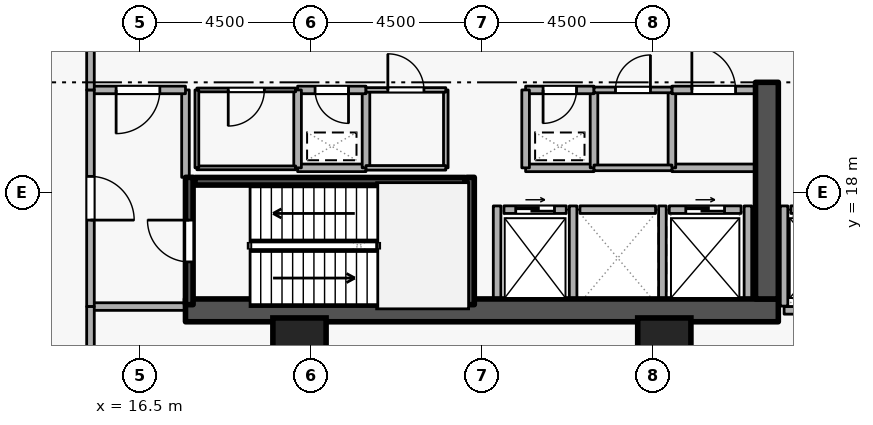
"""IFC4 building model, lengths in metres.
Left out: names, types, materials, properties, quantities, classifications, styles, units other than length and angle.
Written with IfcOpenShell. Run it as: python <this file> out.ifc"""

import sys

from ifc_helpers import new_model, si_unit, direction, frame, frame_2d, origin, origin_2d, place, context, subcontext, project, spatial, rectangle, extrude, element, fill, save


model = new_model("IFC4")
c1 = context("Model", 3, precision=1e-05, world=origin(), true_north=direction((0.0, 1.0)))
c2 = subcontext(c1, "Body", "Model", "MODEL_VIEW")
j1 = project(units=[si_unit("LENGTHUNIT", "METRE"), si_unit("PLANEANGLEUNIT", "RADIAN")], contexts=[c1])
p1 = place(None, origin())
s1 = spatial("IfcSite", under=j1, at=p1, CompositionType="ELEMENT")
p2 = place(p1, origin())
s2 = spatial("IfcBuilding", under=s1, at=p2, CompositionType="ELEMENT")
p3 = place(p2, frame((0.0, 0.0, 71.7)))
s3 = spatial("IfcBuildingStorey", under=s2, at=p3, CompositionType="ELEMENT", Elevation=71.7)
p4 = place(p3, frame((17.7, 14.9, 0.0), z_axis=(0.0, 0.0, 1.0), x_axis=(1.0, 0.0, 0.0)))
e1 = element("IfcWall", 1, at=p4, inside=s3, PredefinedType="SHEAR", context=c2, shape_type="SweptSolid", body=[
    extrude(rectangle(XDim=15.6, YDim=0.6, at=frame_2d((7.8, 0.0))), origin(), (0.0, 0.0, 1.0), 4.2),
])
p5 = place(p3, frame((33.0, 15.2, 0.0), z_axis=(0.0, 0.0, 1.0), x_axis=(0.0, 1.0, 0.0)))
e2 = element("IfcWall", 2, at=p5, inside=s3, PredefinedType="SHEAR", context=c2, shape_type="SweptSolid", body=[
    extrude(rectangle(XDim=5.7, YDim=0.6, at=frame_2d((2.85, 0.0))), origin(), (0.0, 0.0, 1.0), 4.2),
])
for number, where, z_axis, x_axis in (
    (3, (20.7, 14.0, 0.0), (0.0, 0.0, 1.0), (1.0, 0.0, 0.0)),
    (4, (30.3, 14.0, 0.0), (0.0, 0.0, 1.0), (1.0, 0.0, 0.0)),
):
    element("IfcColumn", number, at=place(p3, frame(where, z_axis=z_axis, x_axis=x_axis)), inside=s3, PredefinedType="COLUMN", context=c2, shape_type="SweptSolid", body=[
        extrude(rectangle(XDim=1.4, YDim=1.4, at=origin_2d()), origin(), (0.0, 0.0, 1.0), 4.2),
    ])
p6 = place(p3, frame((26.08, 17.55, 0.0), z_axis=(0.0, 0.0, 1.0), x_axis=(1.0, 0.0, 0.0)))
e5 = element("IfcWall", 5, at=p6, inside=s3, PredefinedType="STANDARD", context=c2, shape_type="SweptSolid", body=[
    extrude(rectangle(XDim=1.64, YDim=0.2, at=frame_2d((0.82, 0.0))), origin(), (0.0, 0.0, 1.0), 3.86),
])
p7 = place(p6, frame((0.31, 0.0, 0.0)))
e6 = element("IfcOpeningElement", 6, at=p7, cuts=e5, PredefinedType="OPENING", context=c2, shape_type="SweptSolid", body=[
    extrude(rectangle(XDim=1.02, YDim=2.06, at=frame_2d((0.51, 1.03))), frame((0.0, 0.11, 0.0), z_axis=(0.0, -1.0, 0.0), x_axis=(1.0, 0.0, 0.0)), (0.0, 0.0, 1.0), 0.22),
])
p8 = place(p3, frame((28.08, 17.55, 0.0), z_axis=(0.0, 0.0, 1.0), x_axis=(1.0, 0.0, 0.0)))
e7 = element("IfcWall", 7, at=p8, inside=s3, PredefinedType="STANDARD", context=c2, shape_type="SweptSolid", body=[
    extrude(rectangle(XDim=1.99, YDim=0.2, at=frame_2d((0.995, 0.0))), origin(), (0.0, 0.0, 1.0), 3.86),
])
p9 = place(p3, frame((30.43, 17.55, 0.0), z_axis=(0.0, 0.0, 1.0), x_axis=(1.0, 0.0, 0.0)))
e8 = element("IfcWall", 8, at=p9, inside=s3, PredefinedType="STANDARD", context=c2, shape_type="SweptSolid", body=[
    extrude(rectangle(XDim=1.89, YDim=0.2, at=frame_2d((0.945, 0.0))), origin(), (0.0, 0.0, 1.0), 3.86),
])
p10 = place(p9, frame((0.435, 0.0, 0.0)))
e9 = element("IfcOpeningElement", 9, at=p10, cuts=e8, PredefinedType="OPENING", context=c2, shape_type="SweptSolid", body=[
    extrude(rectangle(XDim=1.02, YDim=2.06, at=frame_2d((0.51, 1.03))), frame((0.0, 0.11, 0.0), z_axis=(0.0, -1.0, 0.0), x_axis=(1.0, 0.0, 0.0)), (0.0, 0.0, 1.0), 0.22),
])
p11 = place(p3, frame((33.63, 17.55, 0.0), z_axis=(0.0, 0.0, 1.0), x_axis=(1.0, 0.0, 0.0)))
e10 = element("IfcWall", 10, at=p11, inside=s3, PredefinedType="STANDARD", context=c2, shape_type="SweptSolid", body=[
    extrude(rectangle(XDim=1.74, YDim=0.2, at=frame_2d((0.87, 0.0))), origin(), (0.0, 0.0, 1.0), 3.86),
])
p12 = place(p11, frame((0.36, 0.0, 0.0)))
e11 = element("IfcOpeningElement", 11, at=p12, cuts=e10, PredefinedType="OPENING", context=c2, shape_type="SweptSolid", body=[
    extrude(rectangle(XDim=1.02, YDim=2.06, at=frame_2d((0.51, 1.03))), frame((0.0, 0.11, 0.0), z_axis=(0.0, -1.0, 0.0), x_axis=(1.0, 0.0, 0.0)), (0.0, 0.0, 1.0), 0.22),
])
for number, where, z_axis, x_axis in (
    (12, (27.9, 15.212, 0.0), (0.0, 0.0, 1.0), (0.0, 1.0, 0.0)),
    (13, (25.9, 15.212, 0.0), (0.0, 0.0, 1.0), (0.0, 1.0, 0.0)),
    (14, (30.25, 15.212, 0.0), (0.0, 0.0, 1.0), (0.0, 1.0, 0.0)),
    (15, (32.5, 15.212, 0.0), (0.0, 0.0, 1.0), (0.0, 1.0, 0.0)),
):
    element("IfcWall", number, at=place(p3, frame(where, z_axis=z_axis, x_axis=x_axis)), inside=s3, PredefinedType="STANDARD", context=c2, shape_type="SweptSolid", body=[
        extrude(rectangle(XDim=2.436, YDim=0.2, at=frame_2d((1.218, 0.0))), origin(), (0.0, 0.0, 1.0), 3.86),
    ])
p13 = place(p3, frame((33.452, 14.9, 0.0), z_axis=(0.0, 0.0, 1.0), x_axis=(1.0, 0.0, 0.0)))
e16 = element("IfcWall", 16, at=p13, inside=s3, PredefinedType="STANDARD", context=c2, shape_type="SweptSolid", body=[
    extrude(rectangle(XDim=4.196, YDim=0.2, at=frame_2d((2.098, 0.0))), origin(), (0.0, 0.0, 1.0), 3.86),
])
p14 = place(p3, frame((33.45, 15.012, 0.0), z_axis=(0.0, 0.0, 1.0), x_axis=(0.0, 1.0, 0.0)))
e17 = element("IfcWall", 17, at=p14, inside=s3, PredefinedType="STANDARD", context=c2, shape_type="SweptSolid", body=[
    extrude(rectangle(XDim=2.636, YDim=0.2, at=frame_2d((1.318, 0.0))), origin(), (0.0, 0.0, 1.0), 3.86),
])
p15 = place(p3, frame((17.8, 15.05, 0.0), z_axis=(0.0, 0.0, 1.0), x_axis=(0.0, 1.0, 0.0)))
e18 = element("IfcWall", 18, at=p15, inside=s3, PredefinedType="SHEAR", context=c2, shape_type="SweptSolid", body=[
    extrude(rectangle(XDim=3.35, YDim=0.2, at=frame_2d((1.675, 0.0))), origin(), (0.0, 0.0, 1.0), 4.2),
])
p16 = place(p15, frame((1.125, 0.0, 0.0)))
e19 = element("IfcOpeningElement", 19, at=p16, cuts=e18, PredefinedType="OPENING", context=c2, shape_type="SweptSolid", body=[
    extrude(rectangle(XDim=1.1, YDim=2.1, at=frame_2d((0.55, 1.05))), frame((0.0, 0.11, 0.0), z_axis=(0.0, -1.0, 0.0), x_axis=(1.0, 0.0, 0.0)), (0.0, 0.0, 1.0), 0.22),
])
p17 = place(p3, frame((25.2, 18.4, 0.0), z_axis=(0.0, 0.0, 1.0), x_axis=(0.0, -1.0, 0.0)))
e20 = element("IfcWall", 20, at=p17, inside=s3, PredefinedType="SHEAR", context=c2, shape_type="SweptSolid", body=[
    extrude(rectangle(XDim=3.35, YDim=0.2, at=frame_2d((1.675, 0.0))), origin(), (0.0, 0.0, 1.0), 4.2),
])
p18 = place(p3, frame((25.05, 18.297, 0.0), z_axis=(0.0, 0.0, 1.0), x_axis=(-1.0, 0.0, 0.0)))
e21 = element("IfcWall", 21, at=p18, inside=s3, PredefinedType="SHEAR", context=c2, shape_type="SweptSolid", body=[
    extrude(rectangle(XDim=7.1, YDim=0.2, at=frame_2d((3.55, 0.0))), origin(), (0.0, 0.0, 1.0), 4.2),
])
p19 = place(p3, frame((15.2, 15.0, 0.0), z_axis=(0.0, 0.0, 1.0), x_axis=(1.0, 0.0, 0.0)))
e22 = element("IfcWall", 22, at=p19, inside=s3, PredefinedType="STANDARD", context=c2, shape_type="SweptSolid", body=[
    extrude(rectangle(XDim=2.5, YDim=0.2, at=frame_2d((1.25, 0.0))), origin(), (0.0, 0.0, 1.0), 3.86),
])
p20 = place(p3, frame((17.7, 18.4, 0.0), z_axis=(0.0, 0.0, 1.0), x_axis=(0.0, 1.0, 0.0)))
e23 = element("IfcWall", 23, at=p20, inside=s3, PredefinedType="STANDARD", context=c2, shape_type="SweptSolid", body=[
    extrude(rectangle(XDim=2.3, YDim=0.2, at=frame_2d((1.15, 0.0))), origin(), (0.0, 0.0, 1.0), 3.065),
])
p21 = place(p3, frame((17.7, 20.7, 0.0), z_axis=(0.0, 0.0, 1.0), x_axis=(-1.0, 0.0, 0.0)))
e24 = element("IfcWall", 24, at=p21, inside=s3, PredefinedType="STANDARD", context=c2, shape_type="SweptSolid", body=[
    extrude(rectangle(XDim=2.5, YDim=0.2, at=frame_2d((1.25, 0.0))), origin(), (0.0, 0.0, 1.0), 3.86),
])
p22 = place(p21, frame((0.675, 0.0, 0.0)))
e25 = element("IfcOpeningElement", 25, at=p22, cuts=e24, PredefinedType="OPENING", context=c2, shape_type="SweptSolid", body=[
    extrude(rectangle(XDim=1.15, YDim=2.1, at=frame_2d((0.575, 1.05))), frame((0.0, 0.11, 0.0), z_axis=(0.0, -1.0, 0.0), x_axis=(1.0, 0.0, 0.0)), (0.0, 0.0, 1.0), 0.22),
])
p23 = place(p3, frame((15.2, 20.7, 0.0), z_axis=(0.0, 0.0, 1.0), x_axis=(0.0, -1.0, 0.0)))
e26 = element("IfcWall", 26, at=p23, inside=s3, PredefinedType="STANDARD", context=c2, shape_type="SweptSolid", body=[
    extrude(rectangle(XDim=5.7, YDim=0.2, at=frame_2d((2.85, 0.0))), origin(), (0.0, 0.0, 1.0), 3.86),
])
p24 = place(p23, frame((2.275, 0.0, 0.0)))
e27 = element("IfcOpeningElement", 27, at=p24, cuts=e26, PredefinedType="OPENING", context=c2, shape_type="SweptSolid", body=[
    extrude(rectangle(XDim=1.15, YDim=2.1, at=frame_2d((0.575, 1.05))), frame((0.0, 0.11, 0.0), z_axis=(0.0, -1.0, 0.0), x_axis=(1.0, 0.0, 0.0)), (0.0, 0.0, 1.0), 0.22),
])
p25 = place(p3, frame((26.65, 18.65, 0.0), z_axis=(0.0, 0.0, 1.0), x_axis=(1.0, 0.0, 0.0)))
e28 = element("IfcWall", 28, at=p25, inside=s3, PredefinedType="STANDARD", context=c2, shape_type="SweptSolid", body=[
    extrude(rectangle(XDim=1.8, YDim=0.2, at=frame_2d((0.9, 0.0))), origin(), (0.0, 0.0, 1.0), 3.86),
])
p26 = place(p3, frame((28.45, 18.65, 0.0), z_axis=(0.0, 0.0, 1.0), x_axis=(0.0, 1.0, 0.0)))
e29 = element("IfcWall", 29, at=p26, inside=s3, PredefinedType="STANDARD", context=c2, shape_type="SweptSolid", body=[
    extrude(rectangle(XDim=2.05, YDim=0.2, at=frame_2d((1.025, 0.0))), origin(), (0.0, 0.0, 1.0), 3.86),
])
p27 = place(p3, frame((28.45, 20.7, 0.0), z_axis=(0.0, 0.0, 1.0), x_axis=(-1.0, 0.0, 0.0)))
e30 = element("IfcWall", 30, at=p27, inside=s3, PredefinedType="STANDARD", context=c2, shape_type="SweptSolid", body=[
    extrude(rectangle(XDim=1.8, YDim=0.2, at=frame_2d((0.9, 0.0))), origin(), (0.0, 0.0, 1.0), 3.86),
])
p28 = place(p27, frame((0.46, 0.0, 0.0)))
e31 = element("IfcOpeningElement", 31, at=p28, cuts=e30, PredefinedType="OPENING", context=c2, shape_type="SweptSolid", body=[
    extrude(rectangle(XDim=0.88, YDim=2.04, at=frame_2d((0.44, 1.02))), frame((0.0, 0.11, 0.0), z_axis=(0.0, -1.0, 0.0), x_axis=(1.0, 0.0, 0.0)), (0.0, 0.0, 1.0), 0.22),
])
p29 = place(p3, frame((26.65, 20.7, 0.0), z_axis=(0.0, 0.0, 1.0), x_axis=(0.0, -1.0, 0.0)))
e32 = element("IfcWall", 32, at=p29, inside=s3, PredefinedType="STANDARD", context=c2, shape_type="SweptSolid", body=[
    extrude(rectangle(XDim=2.05, YDim=0.2, at=frame_2d((1.025, 0.0))), origin(), (0.0, 0.0, 1.0), 3.86),
])
p30 = place(p3, frame((20.65, 18.65, 0.0), z_axis=(0.0, 0.0, 1.0), x_axis=(1.0, 0.0, 0.0)))
e33 = element("IfcWall", 33, at=p30, inside=s3, PredefinedType="STANDARD", context=c2, shape_type="SweptSolid", body=[
    extrude(rectangle(XDim=1.8, YDim=0.2, at=frame_2d((0.9, 0.0))), origin(), (0.0, 0.0, 1.0), 3.86),
])
p31 = place(p3, frame((22.45, 18.65, 0.0), z_axis=(0.0, 0.0, 1.0), x_axis=(0.0, 1.0, 0.0)))
e34 = element("IfcWall", 34, at=p31, inside=s3, PredefinedType="STANDARD", context=c2, shape_type="SweptSolid", body=[
    extrude(rectangle(XDim=2.05, YDim=0.2, at=frame_2d((1.025, 0.0))), origin(), (0.0, 0.0, 1.0), 3.86),
])
p32 = place(p3, frame((22.45, 20.7, 0.0), z_axis=(0.0, 0.0, 1.0), x_axis=(-1.0, 0.0, 0.0)))
e35 = element("IfcWall", 35, at=p32, inside=s3, PredefinedType="STANDARD", context=c2, shape_type="SweptSolid", body=[
    extrude(rectangle(XDim=1.8, YDim=0.2, at=frame_2d((0.9, 0.0))), origin(), (0.0, 0.0, 1.0), 3.86),
])
p33 = place(p32, frame((0.46, 0.0, 0.0)))
e36 = element("IfcOpeningElement", 36, at=p33, cuts=e35, PredefinedType="OPENING", context=c2, shape_type="SweptSolid", body=[
    extrude(rectangle(XDim=0.88, YDim=2.04, at=frame_2d((0.44, 1.02))), frame((0.0, 0.11, 0.0), z_axis=(0.0, -1.0, 0.0), x_axis=(1.0, 0.0, 0.0)), (0.0, 0.0, 1.0), 0.22),
])
p34 = place(p3, frame((20.65, 20.7, 0.0), z_axis=(0.0, 0.0, 1.0), x_axis=(0.0, -1.0, 0.0)))
e37 = element("IfcWall", 37, at=p34, inside=s3, PredefinedType="STANDARD", context=c2, shape_type="SweptSolid", body=[
    extrude(rectangle(XDim=2.05, YDim=0.2, at=frame_2d((1.025, 0.0))), origin(), (0.0, 0.0, 1.0), 3.86),
])
p35 = place(p3, frame((32.7, 18.65, 0.0), z_axis=(0.0, 0.0, 1.0), x_axis=(-1.0, 0.0, 0.0)))
e38 = element("IfcWall", 38, at=p35, inside=s3, PredefinedType="STANDARD", context=c2, shape_type="SweptSolid", body=[
    extrude(rectangle(XDim=2.2, YDim=0.2, at=frame_2d((1.1, 0.0))), origin(), (0.0, 0.0, 1.0), 3.86),
])
p36 = place(p3, frame((30.5, 18.65, 0.0), z_axis=(0.0, 0.0, 1.0), x_axis=(0.0, 1.0, 0.0)))
e39 = element("IfcWall", 39, at=p36, inside=s3, PredefinedType="STANDARD", context=c2, shape_type="SweptSolid", body=[
    extrude(rectangle(XDim=2.05, YDim=0.2, at=frame_2d((1.025, 0.0))), origin(), (0.0, 0.0, 1.0), 3.86),
])
p37 = place(p3, frame((30.5, 20.7, 0.0), z_axis=(0.0, 0.0, 1.0), x_axis=(1.0, 0.0, 0.0)))
e40 = element("IfcWall", 40, at=p37, inside=s3, PredefinedType="STANDARD", context=c2, shape_type="SweptSolid", body=[
    extrude(rectangle(XDim=2.2, YDim=0.2, at=frame_2d((1.1, 0.0))), origin(), (0.0, 0.0, 1.0), 3.86),
])
p38 = place(p37, frame((0.525, 0.0, 0.0)))
e41 = element("IfcOpeningElement", 41, at=p38, cuts=e40, PredefinedType="OPENING", context=c2, shape_type="SweptSolid", body=[
    extrude(rectangle(XDim=1.15, YDim=2.1, at=frame_2d((0.575, 1.05))), frame((0.0, 0.11, 0.0), z_axis=(0.0, -1.0, 0.0), x_axis=(1.0, 0.0, 0.0)), (0.0, 0.0, 1.0), 0.22),
])
p39 = place(p3, frame((15.2, 22.6, 0.0), z_axis=(0.0, 0.0, 1.0), x_axis=(0.0, -1.0, 0.0)))
e42 = element("IfcWall", 42, at=p39, inside=s3, PredefinedType="STANDARD", context=c2, shape_type="SweptSolid", body=[
    extrude(rectangle(XDim=1.9, YDim=0.2, at=frame_2d((0.95, 0.0))), origin(), (0.0, 0.0, 1.0), 3.86),
])
p40 = place(p3, frame((15.2, 15.0, 0.0), z_axis=(0.0, 0.0, 1.0), x_axis=(0.0, -1.0, 0.0)))
e43 = element("IfcWall", 43, at=p40, inside=s3, PredefinedType="STANDARD", context=c2, shape_type="SweptSolid", body=[
    extrude(rectangle(XDim=2.087, YDim=0.2, at=frame_2d((1.043, 0.0))), origin(), (0.0, 0.0, 1.0), 3.86),
])
p41 = place(p3, frame((18.0, 18.65, 0.0), z_axis=(0.0, 0.0, 1.0), x_axis=(1.0, 0.0, 0.0)))
e44 = element("IfcWall", 44, at=p41, inside=s3, PredefinedType="PARTITIONING", context=c2, shape_type="SweptSolid", body=[
    extrude(rectangle(XDim=2.6, YDim=0.1, at=frame_2d((1.3, 0.0))), origin(), (0.0, 0.0, 1.0), 3.86),
])
p42 = place(p3, frame((20.6, 20.7, 0.0), z_axis=(0.0, 0.0, 1.0), x_axis=(-1.0, 0.0, 0.0)))
e45 = element("IfcWall", 45, at=p42, inside=s3, PredefinedType="PARTITIONING", context=c2, shape_type="SweptSolid", body=[
    extrude(rectangle(XDim=2.6, YDim=0.1, at=frame_2d((1.3, 0.0))), origin(), (0.0, 0.0, 1.0), 3.86),
])
p43 = place(p42, frame((0.825, 0.0, 0.0)))
e46 = element("IfcOpeningElement", 46, at=p43, cuts=e45, PredefinedType="OPENING", context=c2, shape_type="SweptSolid", body=[
    extrude(rectangle(XDim=0.95, YDim=2.1, at=frame_2d((0.475, 1.05))), frame((0.0, 0.06, 0.0), z_axis=(0.0, -1.0, 0.0), x_axis=(1.0, 0.0, 0.0)), (0.0, 0.0, 1.0), 0.12),
])
p44 = place(p3, frame((18.0, 20.7, 0.0), z_axis=(0.0, 0.0, 1.0), x_axis=(0.0, -1.0, 0.0)))
e47 = element("IfcWall", 47, at=p44, inside=s3, PredefinedType="PARTITIONING", context=c2, shape_type="SweptSolid", body=[
    extrude(rectangle(XDim=2.05, YDim=0.1, at=frame_2d((1.025, 0.0))), origin(), (0.0, 0.0, 1.0), 3.065),
])
p45 = place(p3, frame((24.55, 20.7, 0.0), z_axis=(0.0, 0.0, 1.0), x_axis=(0.0, -1.0, 0.0)))
e48 = element("IfcWall", 48, at=p45, inside=s3, PredefinedType="PARTITIONING", context=c2, shape_type="SweptSolid", body=[
    extrude(rectangle(XDim=2.05, YDim=0.12, at=frame_2d((1.025, 0.0))), origin(), (0.0, 0.0, 1.0), 3.86),
])
p46 = place(p3, frame((24.55, 18.65, 0.0), z_axis=(0.0, 0.0, 1.0), x_axis=(-1.0, 0.0, 0.0)))
e49 = element("IfcWall", 49, at=p46, inside=s3, PredefinedType="PARTITIONING", context=c2, shape_type="SweptSolid", body=[
    extrude(rectangle(XDim=2.1, YDim=0.12, at=frame_2d((1.05, 0.0))), origin(), (0.0, 0.0, 1.0), 3.86),
])
p47 = place(p3, frame((22.45, 20.7, 0.0), z_axis=(0.0, 0.0, 1.0), x_axis=(1.0, 0.0, 0.0)))
e50 = element("IfcWall", 50, at=p47, inside=s3, PredefinedType="PARTITIONING", context=c2, shape_type="SweptSolid", body=[
    extrude(rectangle(XDim=2.1, YDim=0.12, at=frame_2d((1.05, 0.0))), origin(), (0.0, 0.0, 1.0), 3.86),
])
p48 = place(p47, frame((0.575, 0.0, 0.0)))
e51 = element("IfcOpeningElement", 51, at=p48, cuts=e50, PredefinedType="OPENING", context=c2, shape_type="SweptSolid", body=[
    extrude(rectangle(XDim=0.95, YDim=2.1, at=frame_2d((0.475, 1.05))), frame((0.0, 0.07, 0.0), z_axis=(0.0, -1.0, 0.0), x_axis=(1.0, 0.0, 0.0)), (0.0, 0.0, 1.0), 0.14),
])
p49 = place(p3, frame((30.5, 18.65, 0.0), z_axis=(0.0, 0.0, 1.0), x_axis=(-1.0, 0.0, 0.0)))
e52 = element("IfcWall", 52, at=p49, inside=s3, PredefinedType="PARTITIONING", context=c2, shape_type="SweptSolid", body=[
    extrude(rectangle(XDim=2.05, YDim=0.15, at=frame_2d((1.025, 0.0))), origin(), (0.0, 0.0, 1.0), 3.86),
])
p50 = place(p3, frame((28.45, 20.7, 0.0), z_axis=(0.0, 0.0, 1.0), x_axis=(1.0, 0.0, 0.0)))
e53 = element("IfcWall", 53, at=p50, inside=s3, PredefinedType="PARTITIONING", context=c2, shape_type="SweptSolid", body=[
    extrude(rectangle(XDim=2.05, YDim=0.15, at=frame_2d((1.025, 0.0))), origin(), (0.0, 0.0, 1.0), 3.86),
])
p51 = place(p50, frame((0.565, 0.0, 0.0)))
e54 = element("IfcOpeningElement", 54, at=p51, cuts=e53, PredefinedType="OPENING", context=c2, shape_type="SweptSolid", body=[
    extrude(rectangle(XDim=0.92, YDim=2.08, at=frame_2d((0.46, 1.04))), frame((0.0, 0.085, 0.0), z_axis=(0.0, -1.0, 0.0), x_axis=(1.0, 0.0, 0.0)), (0.0, 0.0, 1.0), 0.17),
])
p52 = place(p7, origin())
e55 = element("IfcDoor", 55, at=p52, inside=s3, OperationType="SLIDING_TO_LEFT", PredefinedType="DOOR", context=c2, shape_type="SweptSolid", body=[
    extrude(rectangle(XDim=1.02, YDim=2.06, at=frame_2d((0.51, 1.03))), frame((0.0, 0.025, 0.0), z_axis=(0.0, -1.0, 0.0), x_axis=(1.0, 0.0, 0.0)), (0.0, 0.0, 1.0), 0.05),
])
fill(e6, e55)
p53 = place(p10, origin())
e56 = element("IfcDoor", 56, at=p53, inside=s3, OperationType="SLIDING_TO_LEFT", PredefinedType="DOOR", context=c2, shape_type="SweptSolid", body=[
    extrude(rectangle(XDim=1.02, YDim=2.06, at=frame_2d((0.51, 1.03))), frame((0.0, 0.025, 0.0), z_axis=(0.0, -1.0, 0.0), x_axis=(1.0, 0.0, 0.0)), (0.0, 0.0, 1.0), 0.05),
])
fill(e9, e56)
p54 = place(p16, origin())
e57 = element("IfcDoor", 57, at=p54, inside=s3, OperationType="SINGLE_SWING_RIGHT", PredefinedType="DOOR", context=c2, shape_type="SweptSolid", body=[
    extrude(rectangle(XDim=1.1, YDim=2.1, at=frame_2d((0.55, 1.05))), frame((0.0, 0.025, 0.0), z_axis=(0.0, -1.0, 0.0), x_axis=(1.0, 0.0, 0.0)), (0.0, 0.0, 1.0), 0.05),
])
fill(e19, e57)
p55 = place(p22, origin())
e58 = element("IfcDoor", 58, at=p55, inside=s3, OperationType="SINGLE_SWING_RIGHT", PredefinedType="DOOR", context=c2, shape_type="SweptSolid", body=[
    extrude(rectangle(XDim=1.15, YDim=2.1, at=frame_2d((0.575, 1.05))), frame((0.0, 0.025, 0.0), z_axis=(0.0, -1.0, 0.0), x_axis=(1.0, 0.0, 0.0)), (0.0, 0.0, 1.0), 0.05),
])
fill(e25, e58)
p56 = place(p28, origin())
e59 = element("IfcDoor", 59, at=p56, inside=s3, OperationType="SINGLE_SWING_RIGHT", PredefinedType="DOOR", context=c2, shape_type="SweptSolid", body=[
    extrude(rectangle(XDim=0.88, YDim=2.04, at=frame_2d((0.44, 1.02))), frame((0.0, 0.025, 0.0), z_axis=(0.0, -1.0, 0.0), x_axis=(1.0, 0.0, 0.0)), (0.0, 0.0, 1.0), 0.05),
])
fill(e31, e59)
p57 = place(p33, origin())
e60 = element("IfcDoor", 60, at=p57, inside=s3, OperationType="SINGLE_SWING_LEFT", PredefinedType="DOOR", context=c2, shape_type="SweptSolid", body=[
    extrude(rectangle(XDim=0.88, YDim=2.04, at=frame_2d((0.44, 1.02))), frame((0.0, 0.025, 0.0), z_axis=(0.0, -1.0, 0.0), x_axis=(1.0, 0.0, 0.0)), (0.0, 0.0, 1.0), 0.05),
])
fill(e36, e60)
p58 = place(p43, origin())
e61 = element("IfcDoor", 61, at=p58, inside=s3, OperationType="SINGLE_SWING_RIGHT", PredefinedType="DOOR", context=c2, shape_type="SweptSolid", body=[
    extrude(rectangle(XDim=0.95, YDim=2.1, at=frame_2d((0.475, 1.05))), frame((0.0, 0.025, 0.0), z_axis=(0.0, -1.0, 0.0), x_axis=(1.0, 0.0, 0.0)), (0.0, 0.0, 1.0), 0.05),
])
fill(e46, e61)
p59 = place(p48, origin())
e62 = element("IfcDoor", 62, at=p59, inside=s3, OperationType="SINGLE_SWING_LEFT", PredefinedType="DOOR", context=c2, shape_type="SweptSolid", body=[
    extrude(rectangle(XDim=0.95, YDim=2.1, at=frame_2d((0.475, 1.05))), frame((0.0, 0.025, 0.0), z_axis=(0.0, -1.0, 0.0), x_axis=(1.0, 0.0, 0.0)), (0.0, 0.0, 1.0), 0.05),
])
fill(e51, e62)
p60 = place(p51, origin())
e63 = element("IfcDoor", 63, at=p60, inside=s3, OperationType="SINGLE_SWING_RIGHT", PredefinedType="DOOR", context=c2, shape_type="SweptSolid", body=[
    extrude(rectangle(XDim=0.92, YDim=2.08, at=frame_2d((0.46, 1.04))), frame((0.0, 0.025, 0.0), z_axis=(0.0, -1.0, 0.0), x_axis=(1.0, 0.0, 0.0)), (0.0, 0.0, 1.0), 0.05),
])
fill(e54, e63)
p61 = place(p38, origin())
e64 = element("IfcDoor", 64, at=p61, inside=s3, OperationType="SINGLE_SWING_LEFT", PredefinedType="DOOR", context=c2, shape_type="SweptSolid", body=[
    extrude(rectangle(XDim=1.15, YDim=2.1, at=frame_2d((0.575, 1.05))), frame((0.0, 0.025, 0.0), z_axis=(0.0, -1.0, 0.0), x_axis=(1.0, 0.0, 0.0)), (0.0, 0.0, 1.0), 0.05),
])
fill(e41, e64)
p62 = place(p24, origin())
e65 = element("IfcDoor", 65, at=p62, inside=s3, OperationType="SINGLE_SWING_RIGHT", PredefinedType="DOOR", context=c2, shape_type="SweptSolid", body=[
    extrude(rectangle(XDim=1.15, YDim=2.1, at=frame_2d((0.575, 1.05))), frame((0.0, 0.025, 0.0), z_axis=(0.0, -1.0, 0.0), x_axis=(1.0, 0.0, 0.0)), (0.0, 0.0, 1.0), 0.05),
])
fill(e27, e65)
save(model, sys.argv[1])
